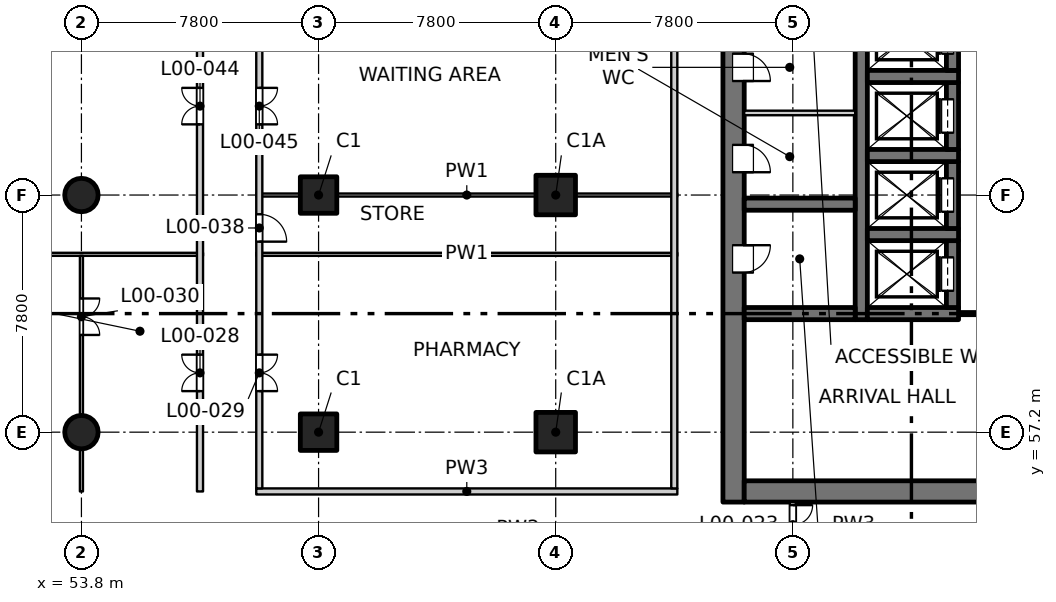
"""IFC4 building model, lengths in metres.
Left out: names, types, materials, properties, quantities, classifications, styles, units other than length and angle.
Written with IfcOpenShell. Run it as: python <this file> out.ifc"""

import sys

from ifc_helpers import new_model, si_unit, direction, frame, frame_2d, origin, origin_2d, place, context, subcontext, project, spatial, rectangle, circle, extrude, element, fill, save


model = new_model("IFC4")
c1 = context("Model", 3, precision=1e-05, world=origin(), true_north=direction((0.0, 1.0)))
c2 = subcontext(c1, "Body", "Model", "MODEL_VIEW")
j1 = project(units=[si_unit("LENGTHUNIT", "METRE"), si_unit("PLANEANGLEUNIT", "RADIAN")], contexts=[c1])
p1 = place(None, origin())
s1 = spatial("IfcSite", under=j1, at=p1, CompositionType="ELEMENT")
p2 = place(p1, origin())
s2 = spatial("IfcBuilding", under=s1, at=p2, CompositionType="ELEMENT")
p3 = place(p2, origin())
s3 = spatial("IfcBuildingStorey", under=s2, at=p3, CompositionType="ELEMENT", Elevation=0.0)
for number, where, z_axis, x_axis in (
    (1, (61.6, 57.2, -0.4), (0.0, 0.0, 1.0), (1.0, 0.0, 0.0)),
    (2, (61.6, 65.0, -0.4), (0.0, 0.0, 1.0), (1.0, 0.0, 0.0)),
):
    element("IfcColumn", number, at=place(p3, frame(where, z_axis=z_axis, x_axis=x_axis)), inside=s3, PredefinedType="COLUMN", context=c2, shape_type="SweptSolid", body=[
        extrude(rectangle(XDim=1.2, YDim=1.2, at=origin_2d()), origin(), (0.0, 0.0, 1.0), 6.1),
    ])
for number, where, z_axis, x_axis in (
    (3, (69.4, 57.2, -0.4), (0.0, 0.0, 1.0), (1.0, 0.0, 0.0)),
    (4, (69.4, 65.0, -0.4), (0.0, 0.0, 1.0), (1.0, 0.0, 0.0)),
):
    element("IfcColumn", number, at=place(p3, frame(where, z_axis=z_axis, x_axis=x_axis)), inside=s3, PredefinedType="COLUMN", context=c2, shape_type="SweptSolid", body=[
        extrude(rectangle(XDim=1.3, YDim=1.3, at=origin_2d()), origin(), (0.0, 0.0, 1.0), 6.1),
    ])
for number, where, z_axis, x_axis in (
    (5, (53.8, 57.2, -0.4), (0.0, 0.0, 1.0), (1.0, 0.0, 0.0)),
    (6, (53.8, 65.0, -0.4), (0.0, 0.0, 1.0), (1.0, 0.0, 0.0)),
):
    element("IfcColumn", number, at=place(p3, frame(where, z_axis=z_axis, x_axis=x_axis)), inside=s3, PredefinedType="COLUMN", context=c2, shape_type="SweptSolid", body=[
        extrude(circle(Radius=0.55, at=origin_2d()), origin(), (0.0, 0.0, 1.0), 6.1),
    ])
p4 = place(p3, frame((75.25, 54.9, -0.4), z_axis=(0.0, 0.0, 1.0), x_axis=(0.0, 1.0, 0.0)))
e7 = element("IfcWall", 7, at=p4, inside=s3, PredefinedType="SOLIDWALL", context=c2, shape_type="SweptSolid", body=[
    extrude(rectangle(XDim=22.4, YDim=0.7, at=frame_2d((11.2, 0.0))), origin(), (0.0, 0.0, 1.0), 6.1),
])
p5 = place(p4, frame((7.55, 0.0, 0.4)))
e8 = element("IfcOpeningElement", 8, at=p5, cuts=e7, PredefinedType="OPENING", context=c2, shape_type="SweptSolid", body=[
    extrude(rectangle(XDim=0.9, YDim=2.1, at=frame_2d((0.45, 1.05))), frame((0.0, 0.36, 0.0), z_axis=(0.0, -1.0, 0.0), x_axis=(1.0, 0.0, 0.0)), (0.0, 0.0, 1.0), 0.72),
])
p6 = place(p4, frame((10.85, 0.0, 0.4)))
e9 = element("IfcOpeningElement", 9, at=p6, cuts=e7, PredefinedType="OPENING", context=c2, shape_type="SweptSolid", body=[
    extrude(rectangle(XDim=0.9, YDim=2.1, at=frame_2d((0.45, 1.05))), frame((0.0, 0.36, 0.0), z_axis=(0.0, -1.0, 0.0), x_axis=(1.0, 0.0, 0.0)), (0.0, 0.0, 1.0), 0.72),
])
p7 = place(p4, frame((13.85, 0.0, 0.4)))
e10 = element("IfcOpeningElement", 10, at=p7, cuts=e7, PredefinedType="OPENING", context=c2, shape_type="SweptSolid", body=[
    extrude(rectangle(XDim=0.9, YDim=2.1, at=frame_2d((0.45, 1.05))), frame((0.0, 0.36, 0.0), z_axis=(0.0, -1.0, 0.0), x_axis=(1.0, 0.0, 0.0)), (0.0, 0.0, 1.0), 0.72),
])
p8 = place(p4, frame((16.85, 0.0, 0.4)))
e11 = element("IfcOpeningElement", 11, at=p8, cuts=e7, PredefinedType="OPENING", context=c2, shape_type="SweptSolid", body=[
    extrude(rectangle(XDim=0.9, YDim=2.1, at=frame_2d((0.45, 1.05))), frame((0.0, 0.36, 0.0), z_axis=(0.0, -1.0, 0.0), x_axis=(1.0, 0.0, 0.0)), (0.0, 0.0, 1.0), 0.72),
])
p9 = place(p4, frame((20.15, 0.0, 0.4)))
e12 = element("IfcOpeningElement", 12, at=p9, cuts=e7, PredefinedType="OPENING", context=c2, shape_type="SweptSolid", body=[
    extrude(rectangle(XDim=0.9, YDim=2.1, at=frame_2d((0.45, 1.05))), frame((0.0, 0.36, 0.0), z_axis=(0.0, -1.0, 0.0), x_axis=(1.0, 0.0, 0.0)), (0.0, 0.0, 1.0), 0.72),
])
p10 = place(p3, frame((75.6, 55.25, -0.4), z_axis=(0.0, 0.0, 1.0), x_axis=(1.0, 0.0, 0.0)))
e13 = element("IfcWall", 13, at=p10, inside=s3, PredefinedType="SOLIDWALL", context=c2, shape_type="SweptSolid", body=[
    extrude(rectangle(XDim=18.8, YDim=0.7, at=frame_2d((9.4, 0.0))), origin(), (0.0, 0.0, 1.0), 6.1),
])
p11 = place(p10, frame((8.65, 0.0, 0.4)))
e14 = element("IfcOpeningElement", 14, at=p11, cuts=e13, PredefinedType="OPENING", context=c2, shape_type="SweptSolid", body=[
    extrude(rectangle(XDim=1.5, YDim=2.1, at=frame_2d((0.75, 1.05))), frame((0.0, 0.36, 0.0), z_axis=(0.0, -1.0, 0.0), x_axis=(1.0, 0.0, 0.0)), (0.0, 0.0, 1.0), 0.72),
])
p12 = place(p3, frame((79.45, 60.9, -0.4), z_axis=(0.0, 0.0, 1.0), x_axis=(0.0, 1.0, 0.0)))
e15 = element("IfcWall", 15, at=p12, inside=s3, PredefinedType="SOLIDWALL", context=c2, shape_type="SweptSolid", body=[
    extrude(rectangle(XDim=16.4, YDim=0.4, at=frame_2d((8.2, 0.0))), origin(), (0.0, 0.0, 1.0), 6.1),
])
p13 = place(p3, frame((79.65, 61.1, -0.4), z_axis=(0.0, 0.0, 1.0), x_axis=(1.0, 0.0, 0.0)))
e16 = element("IfcWall", 16, at=p13, inside=s3, PredefinedType="SOLIDWALL", context=c2, shape_type="SweptSolid", body=[
    extrude(rectangle(XDim=3.0, YDim=0.4, at=frame_2d((1.5, 0.0))), origin(), (0.0, 0.0, 1.0), 6.1),
])
p14 = place(p3, frame((82.45, 61.3, -0.4), z_axis=(0.0, 0.0, 1.0), x_axis=(0.0, 1.0, 0.0)))
e17 = element("IfcWall", 17, at=p14, inside=s3, PredefinedType="SOLIDWALL", context=c2, shape_type="SweptSolid", body=[
    extrude(rectangle(XDim=2.2, YDim=0.4, at=frame_2d((1.1, 0.0))), origin(), (0.0, 0.0, 1.0), 6.1),
])
p15 = place(p14, frame((0.55, 0.0, 0.4)))
e18 = element("IfcOpeningElement", 18, at=p15, cuts=e17, PredefinedType="OPENING", context=c2, shape_type="SweptSolid", body=[
    extrude(rectangle(XDim=1.1, YDim=2.1, at=frame_2d((0.55, 1.05))), frame((0.0, 0.21, 0.0), z_axis=(0.0, -1.0, 0.0), x_axis=(1.0, 0.0, 0.0)), (0.0, 0.0, 1.0), 0.42),
])
p16 = place(p3, frame((79.65, 63.7, -0.4), z_axis=(0.0, 0.0, 1.0), x_axis=(1.0, 0.0, 0.0)))
e19 = element("IfcWall", 19, at=p16, inside=s3, PredefinedType="SOLIDWALL", context=c2, shape_type="SweptSolid", body=[
    extrude(rectangle(XDim=3.0, YDim=0.4, at=frame_2d((1.5, 0.0))), origin(), (0.0, 0.0, 1.0), 6.1),
])
p17 = place(p3, frame((82.45, 63.9, -0.4), z_axis=(0.0, 0.0, 1.0), x_axis=(0.0, 1.0, 0.0)))
e20 = element("IfcWall", 20, at=p17, inside=s3, PredefinedType="SOLIDWALL", context=c2, shape_type="SweptSolid", body=[
    extrude(rectangle(XDim=2.2, YDim=0.4, at=frame_2d((1.1, 0.0))), origin(), (0.0, 0.0, 1.0), 6.1),
])
p18 = place(p17, frame((0.55, 0.0, 0.4)))
e21 = element("IfcOpeningElement", 21, at=p18, cuts=e20, PredefinedType="OPENING", context=c2, shape_type="SweptSolid", body=[
    extrude(rectangle(XDim=1.1, YDim=2.1, at=frame_2d((0.55, 1.05))), frame((0.0, 0.21, 0.0), z_axis=(0.0, -1.0, 0.0), x_axis=(1.0, 0.0, 0.0)), (0.0, 0.0, 1.0), 0.42),
])
p19 = place(p3, frame((79.65, 66.3, -0.4), z_axis=(0.0, 0.0, 1.0), x_axis=(1.0, 0.0, 0.0)))
e22 = element("IfcWall", 22, at=p19, inside=s3, PredefinedType="SOLIDWALL", context=c2, shape_type="SweptSolid", body=[
    extrude(rectangle(XDim=3.0, YDim=0.4, at=frame_2d((1.5, 0.0))), origin(), (0.0, 0.0, 1.0), 6.1),
])
p20 = place(p3, frame((82.45, 66.5, -0.4), z_axis=(0.0, 0.0, 1.0), x_axis=(0.0, 1.0, 0.0)))
e23 = element("IfcWall", 23, at=p20, inside=s3, PredefinedType="SOLIDWALL", context=c2, shape_type="SweptSolid", body=[
    extrude(rectangle(XDim=2.2, YDim=0.4, at=frame_2d((1.1, 0.0))), origin(), (0.0, 0.0, 1.0), 6.1),
])
p21 = place(p20, frame((0.55, 0.0, 0.4)))
e24 = element("IfcOpeningElement", 24, at=p21, cuts=e23, PredefinedType="OPENING", context=c2, shape_type="SweptSolid", body=[
    extrude(rectangle(XDim=1.1, YDim=2.1, at=frame_2d((0.55, 1.05))), frame((0.0, 0.21, 0.0), z_axis=(0.0, -1.0, 0.0), x_axis=(1.0, 0.0, 0.0)), (0.0, 0.0, 1.0), 0.42),
])
p22 = place(p3, frame((79.65, 68.9, -0.4), z_axis=(0.0, 0.0, 1.0), x_axis=(1.0, 0.0, 0.0)))
e25 = element("IfcWall", 25, at=p22, inside=s3, PredefinedType="SOLIDWALL", context=c2, shape_type="SweptSolid", body=[
    extrude(rectangle(XDim=3.0, YDim=0.4, at=frame_2d((1.5, 0.0))), origin(), (0.0, 0.0, 1.0), 6.1),
])
p23 = place(p3, frame((82.45, 69.1, -0.4), z_axis=(0.0, 0.0, 1.0), x_axis=(0.0, 1.0, 0.0)))
e26 = element("IfcWall", 26, at=p23, inside=s3, PredefinedType="SOLIDWALL", context=c2, shape_type="SweptSolid", body=[
    extrude(rectangle(XDim=2.2, YDim=0.4, at=frame_2d((1.1, 0.0))), origin(), (0.0, 0.0, 1.0), 6.1),
])
p24 = place(p23, frame((0.55, 0.0, 0.4)))
e27 = element("IfcOpeningElement", 27, at=p24, cuts=e26, PredefinedType="OPENING", context=c2, shape_type="SweptSolid", body=[
    extrude(rectangle(XDim=1.1, YDim=2.1, at=frame_2d((0.55, 1.05))), frame((0.0, 0.21, 0.0), z_axis=(0.0, -1.0, 0.0), x_axis=(1.0, 0.0, 0.0)), (0.0, 0.0, 1.0), 0.42),
])
for number, where, z_axis, x_axis in (
    (28, (75.6, 61.1, -0.4), (0.0, 0.0, 1.0), (1.0, 0.0, 0.0)),
    (29, (75.6, 64.7, -0.4), (0.0, 0.0, 1.0), (1.0, 0.0, 0.0)),
):
    element("IfcWall", number, at=place(p3, frame(where, z_axis=z_axis, x_axis=x_axis)), inside=s3, PredefinedType="SOLIDWALL", context=c2, shape_type="SweptSolid", body=[
        extrude(rectangle(XDim=3.65, YDim=0.4, at=frame_2d((1.825, 0.0))), origin(), (0.0, 0.0, 1.0), 6.1),
    ])
p25 = place(p3, frame((59.55, 55.25, 0.0), z_axis=(0.0, 0.0, 1.0), x_axis=(1.0, 0.0, 0.0)))
e30 = element("IfcWall", 30, at=p25, inside=s3, PredefinedType="PARTITIONING", context=c2, shape_type="SweptSolid", body=[
    extrude(rectangle(XDim=13.85, YDim=0.2, at=frame_2d((6.925, 0.0))), origin(), (0.0, 0.0, 1.0), 5.7),
])
p26 = place(p3, frame((82.65, 61.1, 0.0), z_axis=(0.0, 0.0, 1.0), x_axis=(1.0, 0.0, 0.0)))
e31 = element("IfcWall", 31, at=p26, inside=s3, PredefinedType="PARTITIONING", context=c2, shape_type="SweptSolid", body=[
    extrude(rectangle(XDim=4.7, YDim=0.15, at=frame_2d((2.35, 0.0))), origin(), (0.0, 0.0, 1.0), 5.7),
])
p27 = place(p26, frame((1.45, 0.0, 0.0)))
e32 = element("IfcOpeningElement", 32, at=p27, cuts=e31, PredefinedType="OPENING", context=c2, shape_type="SweptSolid", body=[
    extrude(rectangle(XDim=1.8, YDim=2.1, at=frame_2d((0.9, 1.05))), frame((0.0, 0.085, 0.0), z_axis=(0.0, -1.0, 0.0), x_axis=(1.0, 0.0, 0.0)), (0.0, 0.0, 1.0), 0.17),
])
p28 = place(p3, frame((50.0, 63.05, 0.0), z_axis=(0.0, 0.0, 1.0), x_axis=(1.0, 0.0, 0.0)))
e33 = element("IfcWall", 33, at=p28, inside=s3, PredefinedType="PARTITIONING", context=c2, shape_type="SweptSolid", body=[
    extrude(rectangle(XDim=7.8, YDim=0.1, at=frame_2d((3.9, 0.0))), origin(), (0.0, 0.0, 1.0), 5.7),
])
for number, where, z_axis, x_axis in (
    (34, (59.55, 63.05, 0.0), (0.0, 0.0, 1.0), (1.0, 0.0, 0.0)),
    (35, (59.55, 65.0, 0.0), (0.0, 0.0, 1.0), (1.0, 0.0, 0.0)),
):
    element("IfcWall", number, at=place(p3, frame(where, z_axis=z_axis, x_axis=x_axis)), inside=s3, PredefinedType="PARTITIONING", context=c2, shape_type="SweptSolid", body=[
        extrude(rectangle(XDim=13.85, YDim=0.1, at=frame_2d((6.925, 0.0))), origin(), (0.0, 0.0, 1.0), 5.7),
    ])
p29 = place(p3, frame((75.6, 67.7, 0.0), z_axis=(0.0, 0.0, 1.0), x_axis=(1.0, 0.0, 0.0)))
e36 = element("IfcWall", 36, at=p29, inside=s3, PredefinedType="PARTITIONING", context=c2, shape_type="SweptSolid", body=[
    extrude(rectangle(XDim=3.65, YDim=0.15, at=frame_2d((1.825, 0.0))), origin(), (0.0, 0.0, 1.0), 5.7),
])
p30 = place(p3, frame((53.8, 55.25, 0.0), z_axis=(0.0, 0.0, 1.0), x_axis=(0.0, 1.0, 0.0)))
e37 = element("IfcWall", 37, at=p30, inside=s3, PredefinedType="PARTITIONING", context=c2, shape_type="SweptSolid", body=[
    extrude(rectangle(XDim=7.75, YDim=0.1, at=frame_2d((3.875, 0.0))), origin(), (0.0, 0.0, 1.0), 5.7),
])
p31 = place(p30, frame((5.147, 0.0, 0.0)))
e38 = element("IfcOpeningElement", 38, at=p31, cuts=e37, PredefinedType="OPENING", context=c2, shape_type="SweptSolid", body=[
    extrude(rectangle(XDim=1.2, YDim=2.1, at=frame_2d((0.6, 1.05))), frame((0.0, 0.06, 0.0), z_axis=(0.0, -1.0, 0.0), x_axis=(1.0, 0.0, 0.0)), (0.0, 0.0, 1.0), 0.12),
])
p32 = place(p3, frame((57.7, 55.25, 0.0), z_axis=(0.0, 0.0, 1.0), x_axis=(0.0, 1.0, 0.0)))
e39 = element("IfcWall", 39, at=p32, inside=s3, PredefinedType="PARTITIONING", context=c2, shape_type="SweptSolid", body=[
    extrude(rectangle(XDim=32.85, YDim=0.2, at=frame_2d((16.425, 0.0))), origin(), (0.0, 0.0, 1.0), 5.7),
])
p33 = place(p32, frame((3.3, 0.0, 0.0)))
e40 = element("IfcOpeningElement", 40, at=p33, cuts=e39, PredefinedType="OPENING", context=c2, shape_type="SweptSolid", body=[
    extrude(rectangle(XDim=1.2, YDim=2.1, at=frame_2d((0.6, 1.05))), frame((0.0, 0.11, 0.0), z_axis=(0.0, -1.0, 0.0), x_axis=(1.0, 0.0, 0.0)), (0.0, 0.0, 1.0), 0.22),
])
p34 = place(p32, frame((12.075, 0.0, 0.0)))
e41 = element("IfcOpeningElement", 41, at=p34, cuts=e39, PredefinedType="OPENING", context=c2, shape_type="SweptSolid", body=[
    extrude(rectangle(XDim=1.2, YDim=2.1, at=frame_2d((0.6, 1.05))), frame((0.0, 0.11, 0.0), z_axis=(0.0, -1.0, 0.0), x_axis=(1.0, 0.0, 0.0)), (0.0, 0.0, 1.0), 0.22),
])
p35 = place(p32, frame((20.85, 0.0, 0.0)))
e42 = element("IfcOpeningElement", 42, at=p35, cuts=e39, PredefinedType="OPENING", context=c2, shape_type="SweptSolid", body=[
    extrude(rectangle(XDim=1.2, YDim=2.1, at=frame_2d((0.6, 1.05))), frame((0.0, 0.11, 0.0), z_axis=(0.0, -1.0, 0.0), x_axis=(1.0, 0.0, 0.0)), (0.0, 0.0, 1.0), 0.22),
])
p36 = place(p32, frame((28.65, 0.0, 0.0)))
e43 = element("IfcOpeningElement", 43, at=p36, cuts=e39, PredefinedType="OPENING", context=c2, shape_type="SweptSolid", body=[
    extrude(rectangle(XDim=1.2, YDim=2.1, at=frame_2d((0.6, 1.05))), frame((0.0, 0.11, 0.0), z_axis=(0.0, -1.0, 0.0), x_axis=(1.0, 0.0, 0.0)), (0.0, 0.0, 1.0), 0.22),
])
p37 = place(p3, frame((59.65, 55.35, 0.0), z_axis=(0.0, 0.0, 1.0), x_axis=(0.0, 1.0, 0.0)))
e44 = element("IfcWall", 44, at=p37, inside=s3, PredefinedType="PARTITIONING", context=c2, shape_type="SweptSolid", body=[
    extrude(rectangle(XDim=32.75, YDim=0.2, at=frame_2d((16.375, 0.0))), origin(), (0.0, 0.0, 1.0), 5.7),
])
p38 = place(p37, frame((3.2, 0.0, 0.0)))
e45 = element("IfcOpeningElement", 45, at=p38, cuts=e44, PredefinedType="OPENING", context=c2, shape_type="SweptSolid", body=[
    extrude(rectangle(XDim=1.2, YDim=2.1, at=frame_2d((0.6, 1.05))), frame((0.0, 0.11, 0.0), z_axis=(0.0, -1.0, 0.0), x_axis=(1.0, 0.0, 0.0)), (0.0, 0.0, 1.0), 0.22),
])
p39 = place(p37, frame((8.117, 0.0, 0.0)))
e46 = element("IfcOpeningElement", 46, at=p39, cuts=e44, PredefinedType="OPENING", context=c2, shape_type="SweptSolid", body=[
    extrude(rectangle(XDim=0.9, YDim=2.1, at=frame_2d((0.45, 1.05))), frame((0.0, 0.11, 0.0), z_axis=(0.0, -1.0, 0.0), x_axis=(1.0, 0.0, 0.0)), (0.0, 0.0, 1.0), 0.22),
])
p40 = place(p37, frame((11.975, 0.0, 0.0)))
e47 = element("IfcOpeningElement", 47, at=p40, cuts=e44, PredefinedType="OPENING", context=c2, shape_type="SweptSolid", body=[
    extrude(rectangle(XDim=1.2, YDim=2.1, at=frame_2d((0.6, 1.05))), frame((0.0, 0.11, 0.0), z_axis=(0.0, -1.0, 0.0), x_axis=(1.0, 0.0, 0.0)), (0.0, 0.0, 1.0), 0.22),
])
p41 = place(p37, frame((20.75, 0.0, 0.0)))
e48 = element("IfcOpeningElement", 48, at=p41, cuts=e44, PredefinedType="OPENING", context=c2, shape_type="SweptSolid", body=[
    extrude(rectangle(XDim=1.2, YDim=2.1, at=frame_2d((0.6, 1.05))), frame((0.0, 0.11, 0.0), z_axis=(0.0, -1.0, 0.0), x_axis=(1.0, 0.0, 0.0)), (0.0, 0.0, 1.0), 0.22),
])
p42 = place(p37, frame((28.55, 0.0, 0.0)))
e49 = element("IfcOpeningElement", 49, at=p42, cuts=e44, PredefinedType="OPENING", context=c2, shape_type="SweptSolid", body=[
    extrude(rectangle(XDim=1.2, YDim=2.1, at=frame_2d((0.6, 1.05))), frame((0.0, 0.11, 0.0), z_axis=(0.0, -1.0, 0.0), x_axis=(1.0, 0.0, 0.0)), (0.0, 0.0, 1.0), 0.22),
])
p43 = place(p3, frame((73.3, 55.35, 0.0), z_axis=(0.0, 0.0, 1.0), x_axis=(0.0, 1.0, 0.0)))
e50 = element("IfcWall", 50, at=p43, inside=s3, PredefinedType="PARTITIONING", context=c2, shape_type="SweptSolid", body=[
    extrude(rectangle(XDim=32.75, YDim=0.2, at=frame_2d((16.375, 0.0))), origin(), (0.0, 0.0, 1.0), 5.7),
])
p44 = place(p3, frame((77.2, 53.4, 0.0), z_axis=(0.0, 0.0, 1.0), x_axis=(0.0, 1.0, 0.0)))
e51 = element("IfcWall", 51, at=p44, inside=s3, PredefinedType="PARTITIONING", context=c2, shape_type="SweptSolid", body=[
    extrude(rectangle(XDim=1.5, YDim=0.2, at=frame_2d((0.75, 0.0))), origin(), (0.0, 0.0, 1.0), 5.7),
])
p45 = place(p44, frame((0.1, 0.0, 0.0)))
e52 = element("IfcOpeningElement", 52, at=p45, cuts=e51, PredefinedType="OPENING", context=c2, shape_type="SweptSolid", body=[
    extrude(rectangle(XDim=1.3, YDim=2.1, at=frame_2d((0.65, 1.05))), frame((0.0, 0.11, 0.0), z_axis=(0.0, -1.0, 0.0), x_axis=(1.0, 0.0, 0.0)), (0.0, 0.0, 1.0), 0.22),
])
p46 = place(p45, origin())
e53 = element("IfcDoor", 53, at=p46, inside=s3, OperationType="DOUBLE_DOOR_SINGLE_SWING", PredefinedType="DOOR", context=c2, shape_type="SweptSolid", body=[
    extrude(rectangle(XDim=1.3, YDim=2.1, at=frame_2d((0.65, 1.05))), frame((0.0, 0.025, 0.0), z_axis=(0.0, -1.0, 0.0), x_axis=(1.0, 0.0, 0.0)), (0.0, 0.0, 1.0), 0.05),
])
fill(e52, e53)
p47 = place(p33, origin())
e54 = element("IfcDoor", 54, at=p47, inside=s3, OperationType="DOUBLE_DOOR_SINGLE_SWING", PredefinedType="DOOR", context=c2, shape_type="SweptSolid", body=[
    extrude(rectangle(XDim=1.2, YDim=2.1, at=frame_2d((0.6, 1.05))), frame((0.0, 0.025, 0.0), z_axis=(0.0, -1.0, 0.0), x_axis=(1.0, 0.0, 0.0)), (0.0, 0.0, 1.0), 0.05),
])
fill(e40, e54)
p48 = place(p38, origin())
e55 = element("IfcDoor", 55, at=p48, inside=s3, OperationType="DOUBLE_DOOR_SINGLE_SWING", PredefinedType="DOOR", context=c2, shape_type="SweptSolid", body=[
    extrude(rectangle(XDim=1.2, YDim=2.1, at=frame_2d((0.6, 1.05))), frame((0.0, 0.025, 0.0), z_axis=(0.0, -1.0, 0.0), x_axis=(1.0, 0.0, 0.0)), (0.0, 0.0, 1.0), 0.05),
])
fill(e45, e55)
p49 = place(p31, origin())
e56 = element("IfcDoor", 56, at=p49, inside=s3, OperationType="DOUBLE_DOOR_SINGLE_SWING", PredefinedType="DOOR", context=c2, shape_type="SweptSolid", body=[
    extrude(rectangle(XDim=1.2, YDim=2.1, at=frame_2d((0.6, 1.05))), frame((0.0, 0.025, 0.0), z_axis=(0.0, -1.0, 0.0), x_axis=(1.0, 0.0, 0.0)), (0.0, 0.0, 1.0), 0.05),
])
fill(e38, e56)
p50 = place(p15, origin())
e57 = element("IfcDoor", 57, at=p50, inside=s3, OperationType="SLIDING_TO_RIGHT", PredefinedType="DOOR", context=c2, shape_type="SweptSolid", body=[
    extrude(rectangle(XDim=1.1, YDim=2.1, at=frame_2d((0.55, 1.05))), frame((0.0, 0.185, 0.0), z_axis=(0.0, -1.0, 0.0), x_axis=(1.0, 0.0, 0.0)), (0.0, 0.0, 1.0), 0.05),
])
fill(e18, e57)
p51 = place(p5, origin())
e58 = element("IfcDoor", 58, at=p51, inside=s3, OperationType="SINGLE_SWING_LEFT", PredefinedType="DOOR", context=c2, shape_type="SweptSolid", body=[
    extrude(rectangle(XDim=0.9, YDim=2.1, at=frame_2d((0.45, 1.05))), frame((0.0, -0.285, 0.0), z_axis=(0.0, -1.0, 0.0), x_axis=(1.0, 0.0, 0.0)), (0.0, 0.0, 1.0), 0.05),
])
fill(e8, e58)
p52 = place(p39, origin())
e59 = element("IfcDoor", 59, at=p52, inside=s3, OperationType="SINGLE_SWING_RIGHT", PredefinedType="DOOR", context=c2, shape_type="SweptSolid", body=[
    extrude(rectangle(XDim=0.9, YDim=2.1, at=frame_2d((0.45, 1.05))), frame((0.0, 0.025, 0.0), z_axis=(0.0, -1.0, 0.0), x_axis=(1.0, 0.0, 0.0)), (0.0, 0.0, 1.0), 0.05),
])
fill(e46, e59)
p53 = place(p18, origin())
e60 = element("IfcDoor", 60, at=p53, inside=s3, OperationType="SLIDING_TO_RIGHT", PredefinedType="DOOR", context=c2, shape_type="SweptSolid", body=[
    extrude(rectangle(XDim=1.1, YDim=2.1, at=frame_2d((0.55, 1.05))), frame((0.0, 0.185, 0.0), z_axis=(0.0, -1.0, 0.0), x_axis=(1.0, 0.0, 0.0)), (0.0, 0.0, 1.0), 0.05),
])
fill(e21, e60)
p54 = place(p6, origin())
e61 = element("IfcDoor", 61, at=p54, inside=s3, OperationType="SINGLE_SWING_RIGHT", PredefinedType="DOOR", context=c2, shape_type="SweptSolid", body=[
    extrude(rectangle(XDim=0.9, YDim=2.1, at=frame_2d((0.45, 1.05))), frame((0.0, -0.285, 0.0), z_axis=(0.0, -1.0, 0.0), x_axis=(1.0, 0.0, 0.0)), (0.0, 0.0, 1.0), 0.05),
])
fill(e9, e61)
p55 = place(p21, origin())
e62 = element("IfcDoor", 62, at=p55, inside=s3, OperationType="SLIDING_TO_RIGHT", PredefinedType="DOOR", context=c2, shape_type="SweptSolid", body=[
    extrude(rectangle(XDim=1.1, YDim=2.1, at=frame_2d((0.55, 1.05))), frame((0.0, 0.185, 0.0), z_axis=(0.0, -1.0, 0.0), x_axis=(1.0, 0.0, 0.0)), (0.0, 0.0, 1.0), 0.05),
])
fill(e24, e62)
p56 = place(p34, origin())
e63 = element("IfcDoor", 63, at=p56, inside=s3, OperationType="DOUBLE_DOOR_SINGLE_SWING", PredefinedType="DOOR", context=c2, shape_type="SweptSolid", body=[
    extrude(rectangle(XDim=1.2, YDim=2.1, at=frame_2d((0.6, 1.05))), frame((0.0, 0.025, 0.0), z_axis=(0.0, -1.0, 0.0), x_axis=(1.0, 0.0, 0.0)), (0.0, 0.0, 1.0), 0.05),
])
fill(e41, e63)
p57 = place(p40, origin())
e64 = element("IfcDoor", 64, at=p57, inside=s3, OperationType="DOUBLE_DOOR_SINGLE_SWING", PredefinedType="DOOR", context=c2, shape_type="SweptSolid", body=[
    extrude(rectangle(XDim=1.2, YDim=2.1, at=frame_2d((0.6, 1.05))), frame((0.0, 0.025, 0.0), z_axis=(0.0, -1.0, 0.0), x_axis=(1.0, 0.0, 0.0)), (0.0, 0.0, 1.0), 0.05),
])
fill(e47, e64)
p58 = place(p7, origin())
e65 = element("IfcDoor", 65, at=p58, inside=s3, OperationType="SINGLE_SWING_RIGHT", PredefinedType="DOOR", context=c2, shape_type="SweptSolid", body=[
    extrude(rectangle(XDim=0.9, YDim=2.1, at=frame_2d((0.45, 1.05))), frame((0.0, -0.285, 0.0), z_axis=(0.0, -1.0, 0.0), x_axis=(1.0, 0.0, 0.0)), (0.0, 0.0, 1.0), 0.05),
])
fill(e10, e65)
p59 = place(p24, origin())
e66 = element("IfcDoor", 66, at=p59, inside=s3, OperationType="SLIDING_TO_LEFT", PredefinedType="DOOR", context=c2, shape_type="SweptSolid", body=[
    extrude(rectangle(XDim=1.1, YDim=2.1, at=frame_2d((0.55, 1.05))), frame((0.0, 0.185, 0.0), z_axis=(0.0, -1.0, 0.0), x_axis=(1.0, 0.0, 0.0)), (0.0, 0.0, 1.0), 0.05),
])
fill(e27, e66)
save(model, sys.argv[1])
